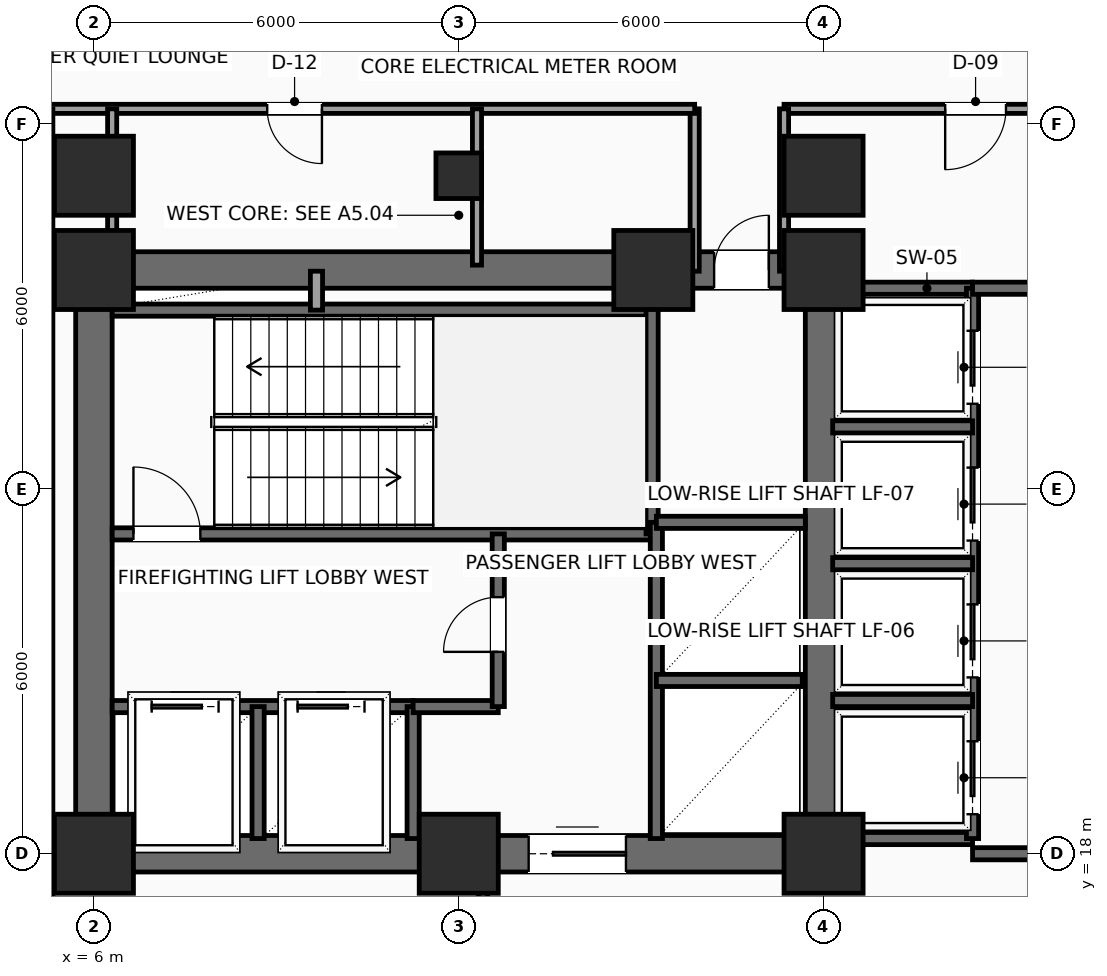
"""IFC4 building model, lengths in metres.
Left out: names, types, materials, properties, quantities, classifications, styles, units other than length and angle.
Written with IfcOpenShell. Run it as: python <this file> out.ifc"""

import sys

from ifc_helpers import new_model, si_unit, direction, frame, frame_2d, origin, origin_2d, place, context, subcontext, project, spatial, rectangle, hollow_rectangle, extrude, element, fill, save


model = new_model("IFC4")
c1 = context("Model", 3, precision=1e-05, world=origin(), true_north=direction((0.0, 1.0)))
c2 = subcontext(c1, "Body", "Model", "MODEL_VIEW")
j1 = project(units=[si_unit("LENGTHUNIT", "METRE"), si_unit("PLANEANGLEUNIT", "RADIAN")], contexts=[c1])
p1 = place(None, origin())
s1 = spatial("IfcSite", under=j1, at=p1, CompositionType="ELEMENT")
p2 = place(p1, origin())
s2 = spatial("IfcBuilding", under=s1, at=p2, CompositionType="ELEMENT")
p3 = place(p2, frame((0.0, 0.0, 75.3)))
s3 = spatial("IfcBuildingStorey", under=s2, at=p3, CompositionType="ELEMENT", Elevation=75.3)
for number, where, z_axis, x_axis in (
    (1, (6.0, 18.0, 0.0), (0.0, 0.0, 1.0), (1.0, 0.0, 0.0)),
    (2, (12.0, 18.0, 0.0), (0.0, 0.0, 1.0), (1.0, 0.0, 0.0)),
    (3, (18.0, 18.0, 0.0), (0.0, 0.0, 1.0), (1.0, 0.0, 0.0)),
    (4, (6.0, 27.6, 0.0), (0.0, 0.0, 1.0), (1.0, 0.0, 0.0)),
    (5, (15.2, 27.6, 0.0), (0.0, 0.0, 1.0), (1.0, 0.0, 0.0)),
    (6, (18.0, 27.6, 0.0), (0.0, 0.0, 1.0), (1.0, 0.0, 0.0)),
    (7, (6.0, 29.15, 0.0), (0.0, 0.0, 1.0), (1.0, 0.0, 0.0)),
):
    element("IfcColumn", number, at=place(p3, frame(where, z_axis=z_axis, x_axis=x_axis)), inside=s3, PredefinedType="COLUMN", context=c2, shape_type="SweptSolid", body=[
        extrude(rectangle(XDim=1.3, YDim=1.3, at=origin_2d()), origin(), (0.0, 0.0, 1.0), 3.9),
    ])
p4 = place(p3, frame((12.0, 29.15, 0.0), z_axis=(0.0, 0.0, 1.0), x_axis=(1.0, 0.0, 0.0)))
e8 = element("IfcColumn", 8, at=p4, inside=s3, PredefinedType="COLUMN", context=c2, shape_type="SweptSolid", body=[
    extrude(hollow_rectangle(XDim=0.75, YDim=0.75, WallThickness=0.035, InnerFilletRadius=0.035, OuterFilletRadius=0.05, at=origin_2d()), origin(), (0.0, 0.0, 1.0), 3.9),
])
p5 = place(p3, frame((18.0, 29.15, 0.0), z_axis=(0.0, 0.0, 1.0), x_axis=(1.0, 0.0, 0.0)))
e9 = element("IfcColumn", 9, at=p5, inside=s3, PredefinedType="COLUMN", context=c2, shape_type="SweptSolid", body=[
    extrude(rectangle(XDim=1.3, YDim=1.3, at=origin_2d()), origin(), (0.0, 0.0, 1.0), 3.9),
])
p6 = place(p3, frame((6.0, 18.0, 0.0), z_axis=(0.0, 0.0, 1.0), x_axis=(1.0, 0.0, 0.0)))
e10 = element("IfcWall", 10, at=p6, inside=s3, PredefinedType="SHEAR", context=c2, shape_type="SweptSolid", body=[
    extrude(rectangle(XDim=12.0, YDim=0.6, at=frame_2d((6.0, 0.0))), origin(), (0.0, 0.0, 1.0), 3.65),
])
p7 = place(p6, frame((7.15, 0.0, 0.0)))
e11 = element("IfcOpeningElement", 11, at=p7, cuts=e10, PredefinedType="OPENING", context=c2, shape_type="SweptSolid", body=[
    extrude(rectangle(XDim=1.6, YDim=2.3, at=frame_2d((0.8, 1.15))), frame((0.0, 0.31, 0.0), z_axis=(0.0, -1.0, 0.0), x_axis=(1.0, 0.0, 0.0)), (0.0, 0.0, 1.0), 0.62),
])
p8 = place(p3, frame((6.0, 27.6, 0.0), z_axis=(0.0, 0.0, 1.0), x_axis=(1.0, 0.0, 0.0)))
e12 = element("IfcWall", 12, at=p8, inside=s3, PredefinedType="SHEAR", context=c2, shape_type="SweptSolid", body=[
    extrude(rectangle(XDim=12.0, YDim=0.6, at=frame_2d((6.0, 0.0))), origin(), (0.0, 0.0, 1.0), 3.65),
])
p9 = place(p8, frame((10.2, 0.0, 0.0)))
e13 = element("IfcOpeningElement", 13, at=p9, cuts=e12, PredefinedType="OPENING", context=c2, shape_type="SweptSolid", body=[
    extrude(rectangle(XDim=0.9, YDim=2.15, at=frame_2d((0.45, 1.075))), frame((0.0, 0.31, 0.0), z_axis=(0.0, -1.0, 0.0), x_axis=(1.0, 0.0, 0.0)), (0.0, 0.0, 1.0), 0.62),
])
for number, where, z_axis, x_axis in (
    (14, (6.0, 18.0, 0.0), (0.0, 0.0, 1.0), (0.0, 1.0, 0.0)),
    (15, (18.0, 18.0, 0.0), (0.0, 0.0, 1.0), (0.0, 1.0, 0.0)),
):
    element("IfcWall", number, at=place(p3, frame(where, z_axis=z_axis, x_axis=x_axis)), inside=s3, PredefinedType="SHEAR", context=c2, shape_type="SweptSolid", body=[
        extrude(rectangle(XDim=9.6, YDim=0.6, at=frame_2d((4.8, 0.0))), origin(), (0.0, 0.0, 1.0), 3.65),
    ])
p10 = place(p3, frame((6.3, 23.26, 0.0), z_axis=(0.0, 0.0, 1.0), x_axis=(1.0, 0.0, 0.0)))
e16 = element("IfcWall", 16, at=p10, inside=s3, PredefinedType="SHEAR", context=c2, shape_type="SweptSolid", body=[
    extrude(rectangle(XDim=8.88, YDim=0.2, at=frame_2d((4.44, 0.0))), origin(), (0.0, 0.0, 1.0), 3.65),
])
p11 = place(p10, frame((0.35, 0.0, 0.0)))
e17 = element("IfcOpeningElement", 17, at=p11, cuts=e16, PredefinedType="OPENING", context=c2, shape_type="SweptSolid", body=[
    extrude(rectangle(XDim=1.1, YDim=2.2, at=frame_2d((0.55, 1.1))), frame((0.0, 0.11, 0.0), z_axis=(0.0, -1.0, 0.0), x_axis=(1.0, 0.0, 0.0)), (0.0, 0.0, 1.0), 0.22),
])
p12 = place(p3, frame((6.3, 26.94, 0.0), z_axis=(0.0, 0.0, 1.0), x_axis=(1.0, 0.0, 0.0)))
e18 = element("IfcWall", 18, at=p12, inside=s3, PredefinedType="SHEAR", context=c2, shape_type="SweptSolid", body=[
    extrude(rectangle(XDim=8.88, YDim=0.2, at=frame_2d((4.44, 0.0))), origin(), (0.0, 0.0, 1.0), 3.65),
])
p13 = place(p3, frame((15.18, 23.26, 0.0), z_axis=(0.0, 0.0, 1.0), x_axis=(0.0, 1.0, 0.0)))
e19 = element("IfcWall", 19, at=p13, inside=s3, PredefinedType="SHEAR", context=c2, shape_type="SweptSolid", body=[
    extrude(rectangle(XDim=4.04, YDim=0.2, at=frame_2d((2.02, 0.0))), origin(), (0.0, 0.0, 1.0), 3.65),
])
p14 = place(p3, frame((6.3, 20.42, 0.0), z_axis=(0.0, 0.0, 1.0), x_axis=(1.0, 0.0, 0.0)))
e20 = element("IfcWall", 20, at=p14, inside=s3, PredefinedType="SHEAR", context=c2, shape_type="SweptSolid", body=[
    extrude(rectangle(XDim=4.95, YDim=0.2, at=frame_2d((2.475, 0.0))), origin(), (0.0, 0.0, 1.0), 3.65),
])
p15 = place(p14, frame((0.65, 0.0, 0.0)))
e21 = element("IfcOpeningElement", 21, at=p15, cuts=e20, PredefinedType="OPENING", context=c2, shape_type="SweptSolid", body=[
    extrude(rectangle(XDim=1.1, YDim=2.2, at=frame_2d((0.55, 1.1))), frame((0.0, 0.11, 0.0), z_axis=(0.0, -1.0, 0.0), x_axis=(1.0, 0.0, 0.0)), (0.0, 0.0, 1.0), 0.22),
])
p16 = place(p14, frame((3.05, 0.0, 0.0)))
e22 = element("IfcOpeningElement", 22, at=p16, cuts=e20, PredefinedType="OPENING", context=c2, shape_type="SweptSolid", body=[
    extrude(rectangle(XDim=1.1, YDim=2.2, at=frame_2d((0.55, 1.1))), frame((0.0, 0.11, 0.0), z_axis=(0.0, -1.0, 0.0), x_axis=(1.0, 0.0, 0.0)), (0.0, 0.0, 1.0), 0.22),
])
for number, where, z_axis, x_axis in (
    (23, (8.7, 18.25, 0.0), (0.0, 0.0, 1.0), (0.0, 1.0, 0.0)),
    (24, (11.25, 18.25, 0.0), (0.0, 0.0, 1.0), (0.0, 1.0, 0.0)),
):
    element("IfcWall", number, at=place(p3, frame(where, z_axis=z_axis, x_axis=x_axis)), inside=s3, PredefinedType="SHEAR", context=c2, shape_type="SweptSolid", body=[
        extrude(rectangle(XDim=2.17, YDim=0.2, at=frame_2d((1.085, 0.0))), origin(), (0.0, 0.0, 1.0), 3.65),
    ])
p17 = place(p3, frame((11.25, 20.42, 0.0), z_axis=(0.0, 0.0, 1.0), x_axis=(1.0, 0.0, 0.0)))
e25 = element("IfcWall", 25, at=p17, inside=s3, PredefinedType="SHEAR", context=c2, shape_type="SweptSolid", body=[
    extrude(rectangle(XDim=1.4, YDim=0.2, at=frame_2d((0.7, 0.0))), origin(), (0.0, 0.0, 1.0), 3.65),
])
p18 = place(p3, frame((12.65, 20.42, 0.0), z_axis=(0.0, 0.0, 1.0), x_axis=(0.0, 1.0, 0.0)))
e26 = element("IfcWall", 26, at=p18, inside=s3, PredefinedType="SHEAR", context=c2, shape_type="SweptSolid", body=[
    extrude(rectangle(XDim=2.84, YDim=0.2, at=frame_2d((1.42, 0.0))), origin(), (0.0, 0.0, 1.0), 3.65),
])
p19 = place(p18, frame((0.9, 0.0, 0.0)))
e27 = element("IfcOpeningElement", 27, at=p19, cuts=e26, PredefinedType="OPENING", context=c2, shape_type="SweptSolid", body=[
    extrude(rectangle(XDim=0.9, YDim=2.15, at=frame_2d((0.45, 1.075))), frame((0.0, 0.11, 0.0), z_axis=(0.0, -1.0, 0.0), x_axis=(1.0, 0.0, 0.0)), (0.0, 0.0, 1.0), 0.22),
])
p20 = place(p3, frame((9.66, 26.94, 0.0), z_axis=(0.0, 0.0, 1.0), x_axis=(0.0, 1.0, 0.0)))
e28 = element("IfcWall", 28, at=p20, inside=s3, PredefinedType="SOLIDWALL", context=c2, shape_type="SweptSolid", body=[
    extrude(rectangle(XDim=0.64, YDim=0.2, at=frame_2d((0.32, 0.0))), origin(), (0.0, 0.0, 1.0), 3.65),
])
p21 = place(p3, frame((15.25, 18.25, 0.0), z_axis=(0.0, 0.0, 1.0), x_axis=(0.0, 1.0, 0.0)))
e29 = element("IfcWall", 29, at=p21, inside=s3, PredefinedType="SHEAR", context=c2, shape_type="SweptSolid", body=[
    extrude(rectangle(XDim=5.2, YDim=0.2, at=frame_2d((2.6, 0.0))), origin(), (0.0, 0.0, 1.0), 3.65),
])
p22 = place(p3, frame((15.25, 20.85, 0.0), z_axis=(0.0, 0.0, 1.0), x_axis=(1.0, 0.0, 0.0)))
e30 = element("IfcWall", 30, at=p22, inside=s3, PredefinedType="SHEAR", context=c2, shape_type="SweptSolid", body=[
    extrude(rectangle(XDim=2.4, YDim=0.2, at=frame_2d((1.2, 0.0))), origin(), (0.0, 0.0, 1.0), 3.65),
])
p23 = place(p3, frame((15.25, 23.45, 0.0), z_axis=(0.0, 0.0, 1.0), x_axis=(1.0, 0.0, 0.0)))
e31 = element("IfcWall", 31, at=p23, inside=s3, PredefinedType="SHEAR", context=c2, shape_type="SweptSolid", body=[
    extrude(rectangle(XDim=2.45, YDim=0.2, at=frame_2d((1.225, 0.0))), origin(), (0.0, 0.0, 1.0), 3.65),
])
for number, where, z_axis, x_axis in (
    (32, (18.1, 27.3, 0.0), (0.0, 0.0, 1.0), (1.0, 0.0, 0.0)),
    (33, (18.1, 18.25, 0.0), (0.0, 0.0, 1.0), (1.0, 0.0, 0.0)),
):
    element("IfcWall", number, at=place(p3, frame(where, z_axis=z_axis, x_axis=x_axis)), inside=s3, PredefinedType="SHEAR", context=c2, shape_type="SweptSolid", body=[
        extrude(rectangle(XDim=2.35, YDim=0.2, at=frame_2d((1.175, 0.0))), origin(), (0.0, 0.0, 1.0), 3.65),
    ])
p24 = place(p3, frame((20.45, 18.25, 0.0), z_axis=(0.0, 0.0, 1.0), x_axis=(0.0, 1.0, 0.0)))
e34 = element("IfcWall", 34, at=p24, inside=s3, PredefinedType="SHEAR", context=c2, shape_type="SweptSolid", body=[
    extrude(rectangle(XDim=9.05, YDim=0.2, at=frame_2d((4.525, 0.0))), origin(), (0.0, 0.0, 1.0), 3.65),
])
p25 = place(p24, frame((0.4, 0.0, 0.0)))
e35 = element("IfcOpeningElement", 35, at=p25, cuts=e34, PredefinedType="OPENING", context=c2, shape_type="SweptSolid", body=[
    extrude(rectangle(XDim=1.2, YDim=2.2, at=frame_2d((0.6, 1.1))), frame((0.0, 0.11, 0.0), z_axis=(0.0, -1.0, 0.0), x_axis=(1.0, 0.0, 0.0)), (0.0, 0.0, 1.0), 0.22),
])
p26 = place(p24, frame((2.65, 0.0, 0.0)))
e36 = element("IfcOpeningElement", 36, at=p26, cuts=e34, PredefinedType="OPENING", context=c2, shape_type="SweptSolid", body=[
    extrude(rectangle(XDim=1.2, YDim=2.2, at=frame_2d((0.6, 1.1))), frame((0.0, 0.11, 0.0), z_axis=(0.0, -1.0, 0.0), x_axis=(1.0, 0.0, 0.0)), (0.0, 0.0, 1.0), 0.22),
])
p27 = place(p24, frame((4.9, 0.0, 0.0)))
e37 = element("IfcOpeningElement", 37, at=p27, cuts=e34, PredefinedType="OPENING", context=c2, shape_type="SweptSolid", body=[
    extrude(rectangle(XDim=1.2, YDim=2.2, at=frame_2d((0.6, 1.1))), frame((0.0, 0.11, 0.0), z_axis=(0.0, -1.0, 0.0), x_axis=(1.0, 0.0, 0.0)), (0.0, 0.0, 1.0), 0.22),
])
p28 = place(p24, frame((7.15, 0.0, 0.0)))
e38 = element("IfcOpeningElement", 38, at=p28, cuts=e34, PredefinedType="OPENING", context=c2, shape_type="SweptSolid", body=[
    extrude(rectangle(XDim=1.2, YDim=2.2, at=frame_2d((0.6, 1.1))), frame((0.0, 0.11, 0.0), z_axis=(0.0, -1.0, 0.0), x_axis=(1.0, 0.0, 0.0)), (0.0, 0.0, 1.0), 0.22),
])
for number, where, z_axis, x_axis in (
    (39, (18.15, 20.52, 0.0), (0.0, 0.0, 1.0), (1.0, 0.0, 0.0)),
    (40, (18.15, 22.77, 0.0), (0.0, 0.0, 1.0), (1.0, 0.0, 0.0)),
    (41, (18.15, 25.02, 0.0), (0.0, 0.0, 1.0), (1.0, 0.0, 0.0)),
):
    element("IfcWall", number, at=place(p3, frame(where, z_axis=z_axis, x_axis=x_axis)), inside=s3, PredefinedType="SHEAR", context=c2, shape_type="SweptSolid", body=[
        extrude(rectangle(XDim=2.3, YDim=0.2, at=frame_2d((1.15, 0.0))), origin(), (0.0, 0.0, 1.0), 3.65),
    ])
p29 = place(p3, frame((20.45, 18.0, 0.0), z_axis=(0.0, 0.0, 1.0), x_axis=(1.0, 0.0, 0.0)))
e42 = element("IfcWall", 42, at=p29, inside=s3, PredefinedType="SHEAR", context=c2, shape_type="SweptSolid", body=[
    extrude(rectangle(XDim=3.5, YDim=0.2, at=frame_2d((1.75, 0.0))), origin(), (0.0, 0.0, 1.0), 3.65),
])
p30 = place(p29, frame((0.95, 0.0, 0.0)))
e43 = element("IfcOpeningElement", 43, at=p30, cuts=e42, PredefinedType="OPENING", context=c2, shape_type="SweptSolid", body=[
    extrude(rectangle(XDim=1.6, YDim=2.3, at=frame_2d((0.8, 1.15))), frame((0.0, 0.11, 0.0), z_axis=(0.0, -1.0, 0.0), x_axis=(1.0, 0.0, 0.0)), (0.0, 0.0, 1.0), 0.22),
])
p31 = place(p3, frame((20.45, 27.3, 0.0), z_axis=(0.0, 0.0, 1.0), x_axis=(1.0, 0.0, 0.0)))
e44 = element("IfcWall", 44, at=p31, inside=s3, PredefinedType="SHEAR", context=c2, shape_type="SweptSolid", body=[
    extrude(rectangle(XDim=3.5, YDim=0.2, at=frame_2d((1.75, 0.0))), origin(), (0.0, 0.0, 1.0), 3.65),
])
p32 = place(p3, frame((23.7, 30.25, 0.0), z_axis=(0.0, 0.0, 1.0), x_axis=(-1.0, 0.0, 0.0)))
e45 = element("IfcWall", 45, at=p32, inside=s3, PredefinedType="PARTITIONING", context=c2, shape_type="SweptSolid", body=[
    extrude(rectangle(XDim=6.35, YDim=0.15, at=frame_2d((3.175, 0.0))), origin(), (0.0, 0.0, 1.0), 3.65),
])
p33 = place(p32, frame((2.7, 0.0, 0.0)))
e46 = element("IfcOpeningElement", 46, at=p33, cuts=e45, PredefinedType="OPENING", context=c2, shape_type="SweptSolid", body=[
    extrude(rectangle(XDim=1.0, YDim=2.2, at=frame_2d((0.5, 1.1))), frame((0.0, 0.085, 0.0), z_axis=(0.0, -1.0, 0.0), x_axis=(1.0, 0.0, 0.0)), (0.0, 0.0, 1.0), 0.17),
])
for number, where, z_axis, x_axis in (
    (47, (17.35, 30.25, 0.0), (0.0, 0.0, 1.0), (0.0, -1.0, 0.0)),
    (48, (15.88, 27.58, 0.0), (0.0, 0.0, 1.0), (0.0, 1.0, 0.0)),
):
    element("IfcWall", number, at=place(p3, frame(where, z_axis=z_axis, x_axis=x_axis)), inside=s3, PredefinedType="PARTITIONING", context=c2, shape_type="SweptSolid", body=[
        extrude(rectangle(XDim=2.67, YDim=0.15, at=frame_2d((1.335, 0.0))), origin(), (0.0, 0.0, 1.0), 3.65),
    ])
p34 = place(p3, frame((15.88, 30.25, 0.0), z_axis=(0.0, 0.0, 1.0), x_axis=(-1.0, 0.0, 0.0)))
e49 = element("IfcWall", 49, at=p34, inside=s3, PredefinedType="PARTITIONING", context=c2, shape_type="SweptSolid", body=[
    extrude(rectangle(XDim=10.63, YDim=0.15, at=frame_2d((5.315, 0.0))), origin(), (0.0, 0.0, 1.0), 3.65),
])
p35 = place(p34, frame((6.13, 0.0, 0.0)))
e50 = element("IfcOpeningElement", 50, at=p35, cuts=e49, PredefinedType="OPENING", context=c2, shape_type="SweptSolid", body=[
    extrude(rectangle(XDim=0.9, YDim=2.1, at=frame_2d((0.45, 1.05))), frame((0.0, 0.085, 0.0), z_axis=(0.0, -1.0, 0.0), x_axis=(1.0, 0.0, 0.0)), (0.0, 0.0, 1.0), 0.17),
])
p36 = place(p3, frame((5.25, 30.25, 0.0), z_axis=(0.0, 0.0, 1.0), x_axis=(0.0, -1.0, 0.0)))
e51 = element("IfcWall", 51, at=p36, inside=s3, PredefinedType="PARTITIONING", context=c2, shape_type="SweptSolid", body=[
    extrude(rectangle(XDim=13.35, YDim=0.15, at=frame_2d((6.675, 0.0))), origin(), (0.0, 0.0, 1.0), 3.65),
])
p37 = place(p3, frame((12.4, 16.9, 0.0), z_axis=(0.0, 0.0, 1.0), x_axis=(0.0, 1.0, 0.0)))
e52 = element("IfcWall", 52, at=p37, inside=s3, PredefinedType="PARTITIONING", context=c2, shape_type="SweptSolid", body=[
    extrude(rectangle(XDim=1.05, YDim=0.15, at=frame_2d((0.525, 0.0))), origin(), (0.0, 0.0, 1.0), 3.65),
])
for number, where, z_axis, x_axis in (
    (53, (6.3, 27.68, 0.0), (0.0, 0.0, 1.0), (0.0, 1.0, 0.0)),
    (54, (12.3, 27.68, 0.0), (0.0, 0.0, 1.0), (0.0, 1.0, 0.0)),
):
    element("IfcWall", number, at=place(p3, frame(where, z_axis=z_axis, x_axis=x_axis)), inside=s3, PredefinedType="PARTITIONING", context=c2, shape_type="SweptSolid", body=[
        extrude(rectangle(XDim=2.57, YDim=0.15, at=frame_2d((1.285, 0.0))), origin(), (0.0, 0.0, 1.0), 2.992),
    ])
p38 = place(p7, origin())
e55 = element("IfcDoor", 55, at=p38, inside=s3, OperationType="DOUBLE_DOOR_SLIDING", PredefinedType="DOOR", context=c2, shape_type="SweptSolid", body=[
    extrude(rectangle(XDim=1.6, YDim=2.3, at=frame_2d((0.8, 1.15))), frame((0.0, 0.025, 0.0), z_axis=(0.0, -1.0, 0.0), x_axis=(1.0, 0.0, 0.0)), (0.0, 0.0, 1.0), 0.05),
])
fill(e11, e55)
p39 = place(p9, origin())
e56 = element("IfcDoor", 56, at=p39, inside=s3, OperationType="SINGLE_SWING_RIGHT", PredefinedType="DOOR", context=c2, shape_type="SweptSolid", body=[
    extrude(rectangle(XDim=0.9, YDim=2.15, at=frame_2d((0.45, 1.075))), frame((0.0, 0.025, 0.0), z_axis=(0.0, -1.0, 0.0), x_axis=(1.0, 0.0, 0.0)), (0.0, 0.0, 1.0), 0.05),
])
fill(e13, e56)
p40 = place(p11, origin())
e57 = element("IfcDoor", 57, at=p40, inside=s3, OperationType="SINGLE_SWING_LEFT", PredefinedType="DOOR", context=c2, shape_type="SweptSolid", body=[
    extrude(rectangle(XDim=1.1, YDim=2.2, at=frame_2d((0.55, 1.1))), frame((0.0, 0.025, 0.0), z_axis=(0.0, -1.0, 0.0), x_axis=(1.0, 0.0, 0.0)), (0.0, 0.0, 1.0), 0.05),
])
fill(e17, e57)
p41 = place(p15, origin())
e58 = element("IfcDoor", 58, at=p41, inside=s3, OperationType="SLIDING_TO_LEFT", PredefinedType="DOOR", context=c2, shape_type="SweptSolid", body=[
    extrude(rectangle(XDim=1.1, YDim=2.2, at=frame_2d((0.55, 1.1))), frame((0.0, 0.025, 0.0), z_axis=(0.0, -1.0, 0.0), x_axis=(1.0, 0.0, 0.0)), (0.0, 0.0, 1.0), 0.05),
])
fill(e21, e58)
p42 = place(p16, origin())
e59 = element("IfcDoor", 59, at=p42, inside=s3, OperationType="SLIDING_TO_LEFT", PredefinedType="DOOR", context=c2, shape_type="SweptSolid", body=[
    extrude(rectangle(XDim=1.1, YDim=2.2, at=frame_2d((0.55, 1.1))), frame((0.0, 0.025, 0.0), z_axis=(0.0, -1.0, 0.0), x_axis=(1.0, 0.0, 0.0)), (0.0, 0.0, 1.0), 0.05),
])
fill(e22, e59)
p43 = place(p19, origin())
e60 = element("IfcDoor", 60, at=p43, inside=s3, OperationType="SINGLE_SWING_LEFT", PredefinedType="DOOR", context=c2, shape_type="SweptSolid", body=[
    extrude(rectangle(XDim=0.9, YDim=2.15, at=frame_2d((0.45, 1.075))), frame((0.0, 0.025, 0.0), z_axis=(0.0, -1.0, 0.0), x_axis=(1.0, 0.0, 0.0)), (0.0, 0.0, 1.0), 0.05),
])
fill(e27, e60)
p44 = place(p25, origin())
e61 = element("IfcDoor", 61, at=p44, inside=s3, OperationType="SLIDING_TO_RIGHT", PredefinedType="DOOR", context=c2, shape_type="SweptSolid", body=[
    extrude(rectangle(XDim=1.2, YDim=2.2, at=frame_2d((0.6, 1.1))), frame((0.0, 0.025, 0.0), z_axis=(0.0, -1.0, 0.0), x_axis=(1.0, 0.0, 0.0)), (0.0, 0.0, 1.0), 0.05),
])
fill(e35, e61)
p45 = place(p26, origin())
e62 = element("IfcDoor", 62, at=p45, inside=s3, OperationType="SLIDING_TO_RIGHT", PredefinedType="DOOR", context=c2, shape_type="SweptSolid", body=[
    extrude(rectangle(XDim=1.2, YDim=2.2, at=frame_2d((0.6, 1.1))), frame((0.0, 0.025, 0.0), z_axis=(0.0, -1.0, 0.0), x_axis=(1.0, 0.0, 0.0)), (0.0, 0.0, 1.0), 0.05),
])
fill(e36, e62)
p46 = place(p27, origin())
e63 = element("IfcDoor", 63, at=p46, inside=s3, OperationType="SLIDING_TO_RIGHT", PredefinedType="DOOR", context=c2, shape_type="SweptSolid", body=[
    extrude(rectangle(XDim=1.2, YDim=2.2, at=frame_2d((0.6, 1.1))), frame((0.0, 0.025, 0.0), z_axis=(0.0, -1.0, 0.0), x_axis=(1.0, 0.0, 0.0)), (0.0, 0.0, 1.0), 0.05),
])
fill(e37, e63)
p47 = place(p28, origin())
e64 = element("IfcDoor", 64, at=p47, inside=s3, OperationType="SLIDING_TO_RIGHT", PredefinedType="DOOR", context=c2, shape_type="SweptSolid", body=[
    extrude(rectangle(XDim=1.2, YDim=2.2, at=frame_2d((0.6, 1.1))), frame((0.0, 0.025, 0.0), z_axis=(0.0, -1.0, 0.0), x_axis=(1.0, 0.0, 0.0)), (0.0, 0.0, 1.0), 0.05),
])
fill(e38, e64)
p48 = place(p33, origin())
e65 = element("IfcDoor", 65, at=p48, inside=s3, OperationType="SINGLE_SWING_RIGHT", PredefinedType="DOOR", context=c2, shape_type="SweptSolid", body=[
    extrude(rectangle(XDim=1.0, YDim=2.2, at=frame_2d((0.5, 1.1))), frame((0.0, 0.025, 0.0), z_axis=(0.0, -1.0, 0.0), x_axis=(1.0, 0.0, 0.0)), (0.0, 0.0, 1.0), 0.05),
])
fill(e46, e65)
p49 = place(p35, origin())
e66 = element("IfcDoor", 66, at=p49, inside=s3, OperationType="SINGLE_SWING_LEFT", PredefinedType="DOOR", context=c2, shape_type="SweptSolid", body=[
    extrude(rectangle(XDim=0.9, YDim=2.1, at=frame_2d((0.45, 1.05))), frame((0.0, 0.025, 0.0), z_axis=(0.0, -1.0, 0.0), x_axis=(1.0, 0.0, 0.0)), (0.0, 0.0, 1.0), 0.05),
])
fill(e50, e66)
save(model, sys.argv[1])
